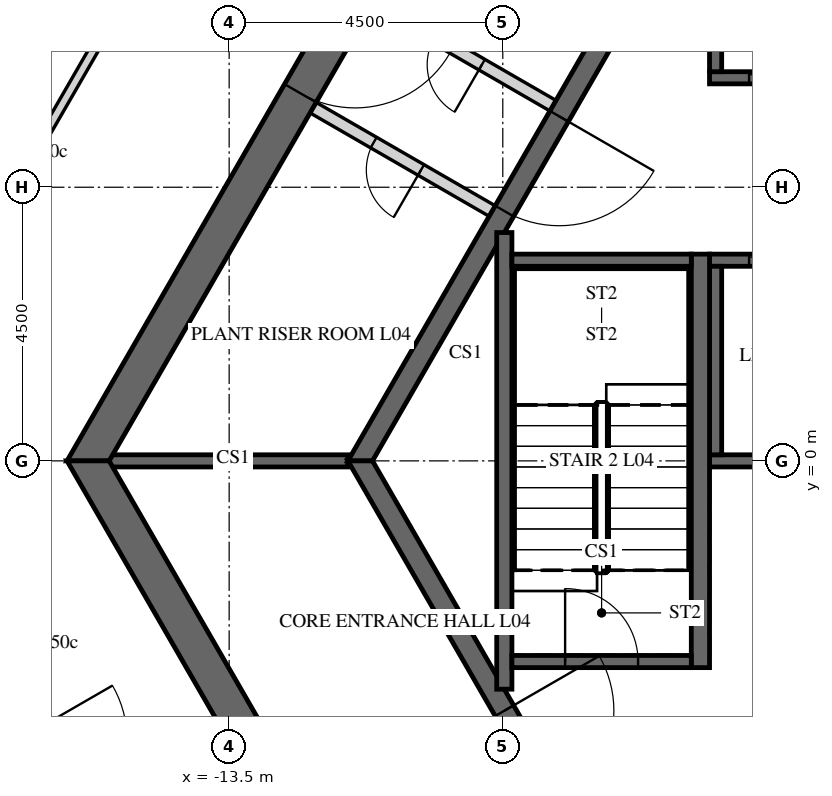
"""IFC4 building model, lengths in metres.
Left out: names, types, materials, properties, quantities, classifications, styles, units other than length and angle.
Written with IfcOpenShell. Run it as: python <this file> out.ifc"""

import sys

from ifc_helpers import new_model, si_unit, direction, frame, frame_2d, origin, place, context, subcontext, project, spatial, polyline, rectangle, outline, extrude, element, fill, save


model = new_model("IFC4")
c1 = context("Model", 3, precision=1e-05, world=origin(), true_north=direction((0.0, 1.0)))
c2 = subcontext(c1, "Body", "Model", "MODEL_VIEW")
j1 = project(units=[si_unit("LENGTHUNIT", "METRE"), si_unit("PLANEANGLEUNIT", "RADIAN")], contexts=[c1])
p1 = place(None, origin())
s1 = spatial("IfcSite", under=j1, at=p1, CompositionType="ELEMENT")
p2 = place(p1, origin())
s2 = spatial("IfcBuilding", under=s1, at=p2, CompositionType="ELEMENT")
p3 = place(p2, frame((0.0, 0.0, 26.0)))
s3 = spatial("IfcBuildingStorey", under=s2, at=p3, CompositionType="ELEMENT", Elevation=26.0)
p4 = place(p3, frame((-7.91, 13.7, -0.25), z_axis=(0.0, 0.0, 1.0), x_axis=(-0.499999880136, -0.866025472988, 0.0)))
e1 = element("IfcWall", 1, at=p4, inside=s3, PredefinedType="SHEAR", context=c2, shape_type="SweptSolid", body=[
    extrude(outline(polyline([(-0.173, -0.3), (15.993, -0.3), (15.646, 0.3), (0.173, 0.3), (-0.173, -0.3)])), origin(), (0.0, 0.0, 1.0), 5.45),
])
p5 = place(p4, frame((7.039, 0.0, 0.25)))
e2 = element("IfcOpeningElement", 2, at=p5, cuts=e1, PredefinedType="OPENING", context=c2, shape_type="SweptSolid", body=[
    extrude(rectangle(XDim=1.8, YDim=2.4, at=frame_2d((0.9, 1.2))), frame((0.0, 0.31, 0.0), z_axis=(0.0, -1.0, 0.0), x_axis=(1.0, 0.0, 0.0)), (0.0, 0.0, 1.0), 0.62),
])
p6 = place(p3, frame((-15.819, 0.0, -0.25), z_axis=(0.0, 0.0, 1.0), x_axis=(0.499999880136, -0.866025472988, 0.0)))
e3 = element("IfcWall", 3, at=p6, inside=s3, PredefinedType="SHEAR", context=c2, shape_type="SweptSolid", body=[
    extrude(outline(polyline([(-0.173, -0.3), (15.993, -0.3), (15.646, 0.3), (0.173, 0.3), (-0.173, -0.3)])), origin(), (0.0, 0.0, 1.0), 5.45),
])
p7 = place(p6, frame((6.981, 0.0, 0.25)))
e4 = element("IfcOpeningElement", 4, at=p7, cuts=e3, PredefinedType="OPENING", context=c2, shape_type="SweptSolid", body=[
    extrude(rectangle(XDim=1.8, YDim=2.4, at=frame_2d((0.9, 1.2))), frame((0.0, 0.31, 0.0), z_axis=(0.0, -1.0, 0.0), x_axis=(1.0, 0.0, 0.0)), (0.0, 0.0, 1.0), 0.62),
])
p8 = place(p3, frame((-5.673, 9.825, -0.25), z_axis=(0.0, 0.0, 1.0), x_axis=(-0.499995046907, -0.866028263435, 0.0)))
e5 = element("IfcWall", 5, at=p8, inside=s3, PredefinedType="SHEAR", context=c2, shape_type="SweptSolid", body=[
    extrude(outline(polyline([(-0.101, -0.175), (11.446, -0.175), (11.244, 0.175), (0.101, 0.175), (-0.101, -0.175)])), origin(), (0.0, 0.0, 1.0), 5.45),
])
p9 = place(p8, frame((4.801, 0.0, 0.25)))
e6 = element("IfcOpeningElement", 6, at=p9, cuts=e5, PredefinedType="OPENING", context=c2, shape_type="SweptSolid", body=[
    extrude(rectangle(XDim=1.8, YDim=2.4, at=frame_2d((0.9, 1.2))), frame((0.0, 0.185, 0.0), z_axis=(0.0, -1.0, 0.0), x_axis=(1.0, 0.0, 0.0)), (0.0, 0.0, 1.0), 0.37),
])
p10 = place(p3, frame((-11.345, 0.0, -0.25), z_axis=(0.0, 0.0, 1.0), x_axis=(0.499995046907, -0.866028263435, 0.0)))
e7 = element("IfcWall", 7, at=p10, inside=s3, PredefinedType="SHEAR", context=c2, shape_type="SweptSolid", body=[
    extrude(outline(polyline([(-0.101, -0.175), (11.446, -0.175), (11.244, 0.175), (0.101, 0.175), (-0.101, -0.175)])), origin(), (0.0, 0.0, 1.0), 5.45),
])
p11 = place(p10, frame((4.744, 0.0, 0.25)))
e8 = element("IfcOpeningElement", 8, at=p11, cuts=e7, PredefinedType="OPENING", context=c2, shape_type="SweptSolid", body=[
    extrude(rectangle(XDim=1.8, YDim=2.4, at=frame_2d((0.9, 1.2))), frame((0.0, 0.185, 0.0), z_axis=(0.0, -1.0, 0.0), x_axis=(1.0, 0.0, 0.0)), (0.0, 0.0, 1.0), 0.37),
])
p12 = place(p3, frame((-5.6, 6.3, -0.25), z_axis=(0.0, 0.0, 1.0), x_axis=(1.0, 0.0, 0.0)))
e9 = element("IfcWall", 9, at=p12, inside=s3, PredefinedType="SHEAR", context=c2, shape_type="SweptSolid", body=[
    extrude(rectangle(XDim=11.2, YDim=0.2, at=frame_2d((5.6, 0.0))), origin(), (0.0, 0.0, 1.0), 5.5),
])
p13 = place(p12, frame((0.65, 0.0, 0.25)))
e10 = element("IfcOpeningElement", 10, at=p13, cuts=e9, PredefinedType="OPENING", context=c2, shape_type="SweptSolid", body=[
    extrude(rectangle(XDim=1.1, YDim=2.1, at=frame_2d((0.55, 1.05))), frame((0.0, 0.11, 0.0), z_axis=(0.0, -1.0, 0.0), x_axis=(1.0, 0.0, 0.0)), (0.0, 0.0, 1.0), 0.22),
])
p14 = place(p12, frame((2.85, 0.0, 0.25)))
e11 = element("IfcOpeningElement", 11, at=p14, cuts=e9, PredefinedType="OPENING", context=c2, shape_type="SweptSolid", body=[
    extrude(rectangle(XDim=1.1, YDim=2.1, at=frame_2d((0.55, 1.05))), frame((0.0, 0.11, 0.0), z_axis=(0.0, -1.0, 0.0), x_axis=(1.0, 0.0, 0.0)), (0.0, 0.0, 1.0), 0.22),
])
p15 = place(p12, frame((5.05, 0.0, 0.25)))
e12 = element("IfcOpeningElement", 12, at=p15, cuts=e9, PredefinedType="OPENING", context=c2, shape_type="SweptSolid", body=[
    extrude(rectangle(XDim=1.1, YDim=2.1, at=frame_2d((0.55, 1.05))), frame((0.0, 0.11, 0.0), z_axis=(0.0, -1.0, 0.0), x_axis=(1.0, 0.0, 0.0)), (0.0, 0.0, 1.0), 0.22),
])
p16 = place(p12, frame((7.25, 0.0, 0.25)))
e13 = element("IfcOpeningElement", 13, at=p16, cuts=e9, PredefinedType="OPENING", context=c2, shape_type="SweptSolid", body=[
    extrude(rectangle(XDim=1.1, YDim=2.1, at=frame_2d((0.55, 1.05))), frame((0.0, 0.11, 0.0), z_axis=(0.0, -1.0, 0.0), x_axis=(1.0, 0.0, 0.0)), (0.0, 0.0, 1.0), 0.22),
])
p17 = place(p12, frame((9.45, 0.0, 0.25)))
e14 = element("IfcOpeningElement", 14, at=p17, cuts=e9, PredefinedType="OPENING", context=c2, shape_type="SweptSolid", body=[
    extrude(rectangle(XDim=1.1, YDim=2.1, at=frame_2d((0.55, 1.05))), frame((0.0, 0.11, 0.0), z_axis=(0.0, -1.0, 0.0), x_axis=(1.0, 0.0, 0.0)), (0.0, 0.0, 1.0), 0.22),
])
p18 = place(p3, frame((-5.5, 6.4, -0.25), z_axis=(0.0, 0.0, 1.0), x_axis=(0.0, 1.0, 0.0)))
e15 = element("IfcWall", 15, at=p18, inside=s3, PredefinedType="SHEAR", context=c2, shape_type="SweptSolid", body=[
    extrude(rectangle(XDim=2.9, YDim=0.2, at=frame_2d((1.45, 0.0))), origin(), (0.0, 0.0, 1.0), 5.5),
])
p19 = place(p3, frame((-5.6, 3.3, -0.25), z_axis=(0.0, 0.0, 1.0), x_axis=(1.0, 0.0, 0.0)))
e16 = element("IfcWall", 16, at=p19, inside=s3, PredefinedType="SHEAR", context=c2, shape_type="SweptSolid", body=[
    extrude(rectangle(XDim=11.2, YDim=0.2, at=frame_2d((5.6, 0.0))), origin(), (0.0, 0.0, 1.0), 5.5),
])
p20 = place(p19, frame((0.65, 0.0, 0.25)))
e17 = element("IfcOpeningElement", 17, at=p20, cuts=e16, PredefinedType="OPENING", context=c2, shape_type="SweptSolid", body=[
    extrude(rectangle(XDim=1.1, YDim=2.1, at=frame_2d((0.55, 1.05))), frame((0.0, 0.11, 0.0), z_axis=(0.0, -1.0, 0.0), x_axis=(1.0, 0.0, 0.0)), (0.0, 0.0, 1.0), 0.22),
])
p21 = place(p19, frame((2.85, 0.0, 0.25)))
e18 = element("IfcOpeningElement", 18, at=p21, cuts=e16, PredefinedType="OPENING", context=c2, shape_type="SweptSolid", body=[
    extrude(rectangle(XDim=1.1, YDim=2.1, at=frame_2d((0.55, 1.05))), frame((0.0, 0.11, 0.0), z_axis=(0.0, -1.0, 0.0), x_axis=(1.0, 0.0, 0.0)), (0.0, 0.0, 1.0), 0.22),
])
p22 = place(p19, frame((5.05, 0.0, 0.25)))
e19 = element("IfcOpeningElement", 19, at=p22, cuts=e16, PredefinedType="OPENING", context=c2, shape_type="SweptSolid", body=[
    extrude(rectangle(XDim=1.1, YDim=2.1, at=frame_2d((0.55, 1.05))), frame((0.0, 0.11, 0.0), z_axis=(0.0, -1.0, 0.0), x_axis=(1.0, 0.0, 0.0)), (0.0, 0.0, 1.0), 0.22),
])
p23 = place(p19, frame((7.25, 0.0, 0.25)))
e20 = element("IfcOpeningElement", 20, at=p23, cuts=e16, PredefinedType="OPENING", context=c2, shape_type="SweptSolid", body=[
    extrude(rectangle(XDim=1.1, YDim=2.1, at=frame_2d((0.55, 1.05))), frame((0.0, 0.11, 0.0), z_axis=(0.0, -1.0, 0.0), x_axis=(1.0, 0.0, 0.0)), (0.0, 0.0, 1.0), 0.22),
])
p24 = place(p19, frame((9.45, 0.0, 0.25)))
e21 = element("IfcOpeningElement", 21, at=p24, cuts=e16, PredefinedType="OPENING", context=c2, shape_type="SweptSolid", body=[
    extrude(rectangle(XDim=1.1, YDim=2.1, at=frame_2d((0.55, 1.05))), frame((0.0, 0.11, 0.0), z_axis=(0.0, -1.0, 0.0), x_axis=(1.0, 0.0, 0.0)), (0.0, 0.0, 1.0), 0.22),
])
p25 = place(p3, frame((-5.6, 0.0, -0.25), z_axis=(0.0, 0.0, 1.0), x_axis=(1.0, 0.0, 0.0)))
e22 = element("IfcWall", 22, at=p25, inside=s3, PredefinedType="SHEAR", context=c2, shape_type="SweptSolid", body=[
    extrude(rectangle(XDim=11.2, YDim=0.2, at=frame_2d((5.6, 0.0))), origin(), (0.0, 0.0, 1.0), 5.5),
])
p26 = place(p3, frame((-5.5, 0.1, -0.25), z_axis=(0.0, 0.0, 1.0), x_axis=(0.0, 1.0, 0.0)))
e23 = element("IfcWall", 23, at=p26, inside=s3, PredefinedType="SHEAR", context=c2, shape_type="SweptSolid", body=[
    extrude(rectangle(XDim=3.1, YDim=0.2, at=frame_2d((1.55, 0.0))), origin(), (0.0, 0.0, 1.0), 5.5),
])
p27 = place(p3, frame((-11.547, 0.0, -0.25), z_axis=(0.0, 0.0, 1.0), x_axis=(-1.0, 0.0, 0.0)))
e24 = element("IfcWall", 24, at=p27, inside=s3, PredefinedType="SHEAR", context=c2, shape_type="SweptSolid", body=[
    extrude(rectangle(XDim=3.926, YDim=0.2, at=frame_2d((1.963, 0.0))), origin(), (0.0, 0.0, 1.0), 5.45),
])
p28 = place(p3, frame((-9.175, 4.109, 0.0), z_axis=(0.0, 0.0, 1.0), x_axis=(-0.865989465428, 0.500062241894, 0.0)))
e25 = element("IfcWall", 25, at=p28, inside=s3, PredefinedType="PARTITIONING", context=c2, shape_type="SweptSolid", body=[
    extrude(rectangle(XDim=3.4, YDim=0.2, at=frame_2d((1.7, 0.0))), origin(), (0.0, 0.0, 1.0), 5.25),
])
p29 = place(p28, frame((1.351, 0.0, 0.0)))
e26 = element("IfcOpeningElement", 26, at=p29, cuts=e25, PredefinedType="OPENING", context=c2, shape_type="SweptSolid", body=[
    extrude(rectangle(XDim=0.9, YDim=2.1, at=frame_2d((0.45, 1.05))), frame((0.0, 0.11, 0.0), z_axis=(0.0, -1.0, 0.0), x_axis=(1.0, 0.0, 0.0)), (0.0, 0.0, 1.0), 0.22),
])
p30 = place(p3, frame((-8.175, 5.841, 0.0), z_axis=(0.0, 0.0, 1.0), x_axis=(-0.866020560687, 0.500008388397, 0.0)))
e27 = element("IfcWall", 27, at=p30, inside=s3, PredefinedType="PARTITIONING", context=c2, shape_type="SweptSolid", body=[
    extrude(rectangle(XDim=3.4, YDim=0.2, at=frame_2d((1.7, 0.0))), origin(), (0.0, 0.0, 1.0), 5.25),
])
p31 = place(p30, frame((1.35, 0.0, 0.0)))
e28 = element("IfcOpeningElement", 28, at=p31, cuts=e27, PredefinedType="OPENING", context=c2, shape_type="SweptSolid", body=[
    extrude(rectangle(XDim=0.9, YDim=2.1, at=frame_2d((0.45, 1.05))), frame((0.0, 0.11, 0.0), z_axis=(0.0, -1.0, 0.0), x_axis=(1.0, 0.0, 0.0)), (0.0, 0.0, 1.0), 0.22),
])
p32 = place(p3, frame((-5.75, -3.4, -0.25), z_axis=(0.0, 0.0, 1.0), x_axis=(0.0, 1.0, 0.0)))
e29 = element("IfcWall", 29, at=p32, inside=s3, PredefinedType="SHEAR", context=c2, shape_type="SweptSolid", body=[
    extrude(rectangle(XDim=6.8, YDim=0.3, at=frame_2d((3.4, 0.0))), origin(), (0.0, 0.0, 1.0), 5.5),
])
p33 = place(p3, frame((-8.975, -3.755, -0.25), z_axis=(0.0, 0.0, 1.0), x_axis=(0.0, 1.0, 0.0)))
e30 = element("IfcWall", 30, at=p33, inside=s3, PredefinedType="SHEAR", context=c2, shape_type="SweptSolid", body=[
    extrude(rectangle(XDim=7.51, YDim=0.25, at=frame_2d((3.755, 0.0))), origin(), (0.0, 0.0, 1.0), 5.5),
])
p34 = place(p3, frame((-8.85, 3.3, -0.25), z_axis=(0.0, 0.0, 1.0), x_axis=(1.0, 0.0, 0.0)))
e31 = element("IfcWall", 31, at=p34, inside=s3, PredefinedType="SHEAR", context=c2, shape_type="SweptSolid", body=[
    extrude(rectangle(XDim=2.95, YDim=0.2, at=frame_2d((1.475, 0.0))), origin(), (0.0, 0.0, 1.0), 5.5),
])
p35 = place(p3, frame((-8.85, -3.3, -0.25), z_axis=(0.0, 0.0, 1.0), x_axis=(1.0, 0.0, 0.0)))
e32 = element("IfcWall", 32, at=p35, inside=s3, PredefinedType="SHEAR", context=c2, shape_type="SweptSolid", body=[
    extrude(rectangle(XDim=2.95, YDim=0.2, at=frame_2d((1.475, 0.0))), origin(), (0.0, 0.0, 1.0), 5.5),
])
p36 = place(p35, frame((0.875, 0.0, 0.25)))
e33 = element("IfcOpeningElement", 33, at=p36, cuts=e32, PredefinedType="OPENING", context=c2, shape_type="SweptSolid", body=[
    extrude(rectangle(XDim=1.2, YDim=2.4, at=frame_2d((0.6, 1.2))), frame((0.0, 0.11, 0.0), z_axis=(0.0, -1.0, 0.0), x_axis=(1.0, 0.0, 0.0)), (0.0, 0.0, 1.0), 0.22),
])
p37 = place(p3, frame((-18.649, -1.7, 0.0), z_axis=(0.0, 0.0, 1.0), x_axis=(0.499976511579, -0.866038964406, 0.0)))
e34 = element("IfcWall", 34, at=p37, inside=s3, PredefinedType="PARTITIONING", context=c2, shape_type="SweptSolid", body=[
    extrude(rectangle(XDim=8.485, YDim=0.15, at=frame_2d((4.242, 0.0))), origin(), (0.0, 0.0, 1.0), 5.2),
])
p38 = place(p37, frame((3.342, 0.0, 0.0)))
e35 = element("IfcOpeningElement", 35, at=p38, cuts=e34, PredefinedType="OPENING", context=c2, shape_type="SweptSolid", body=[
    extrude(rectangle(XDim=1.8, YDim=2.1, at=frame_2d((0.9, 1.05))), frame((0.0, 0.085, 0.0), z_axis=(0.0, -1.0, 0.0), x_axis=(1.0, 0.0, 0.0)), (0.0, 0.0, 1.0), 0.17),
])
p39 = place(p3, frame((-14.723, 8.5, 0.0), z_axis=(0.0, 0.0, 1.0), x_axis=(-0.499993197506, -0.86602933117, 0.0)))
e36 = element("IfcWall", 36, at=p39, inside=s3, PredefinedType="PARTITIONING", context=c2, shape_type="SweptSolid", body=[
    extrude(rectangle(XDim=7.91, YDim=0.15, at=frame_2d((3.955, 0.0))), origin(), (0.0, 0.0, 1.0), 5.2),
])
p40 = place(p5, origin())
e37 = element("IfcDoor", 37, at=p40, inside=s3, OperationType="DOUBLE_DOOR_SINGLE_SWING", PredefinedType="DOOR", context=c2, shape_type="SweptSolid", body=[
    extrude(rectangle(XDim=1.8, YDim=2.4, at=frame_2d((0.9, 1.2))), frame((0.0, 0.025, 0.0), z_axis=(0.0, -1.0, 0.0), x_axis=(1.0, 0.0, 0.0)), (0.0, 0.0, 1.0), 0.05),
])
fill(e2, e37)
p41 = place(p9, origin())
e38 = element("IfcDoor", 38, at=p41, inside=s3, OperationType="DOUBLE_DOOR_SINGLE_SWING", PredefinedType="DOOR", context=c2, shape_type="SweptSolid", body=[
    extrude(rectangle(XDim=1.8, YDim=2.4, at=frame_2d((0.9, 1.2))), frame((0.0, 0.025, 0.0), z_axis=(0.0, -1.0, 0.0), x_axis=(1.0, 0.0, 0.0)), (0.0, 0.0, 1.0), 0.05),
])
fill(e6, e38)
p42 = place(p11, origin())
e39 = element("IfcDoor", 39, at=p42, inside=s3, OperationType="DOUBLE_DOOR_SINGLE_SWING", PredefinedType="DOOR", context=c2, shape_type="SweptSolid", body=[
    extrude(rectangle(XDim=1.8, YDim=2.4, at=frame_2d((0.9, 1.2))), frame((0.0, 0.025, 0.0), z_axis=(0.0, -1.0, 0.0), x_axis=(1.0, 0.0, 0.0)), (0.0, 0.0, 1.0), 0.05),
])
fill(e8, e39)
p43 = place(p29, origin())
e40 = element("IfcDoor", 40, at=p43, inside=s3, OperationType="SINGLE_SWING_LEFT", PredefinedType="DOOR", context=c2, shape_type="SweptSolid", body=[
    extrude(rectangle(XDim=0.9, YDim=2.1, at=frame_2d((0.45, 1.05))), frame((0.0, 0.025, 0.0), z_axis=(0.0, -1.0, 0.0), x_axis=(1.0, 0.0, 0.0)), (0.0, 0.0, 1.0), 0.05),
])
fill(e26, e40)
p44 = place(p31, origin())
e41 = element("IfcDoor", 41, at=p44, inside=s3, OperationType="SINGLE_SWING_LEFT", PredefinedType="DOOR", context=c2, shape_type="SweptSolid", body=[
    extrude(rectangle(XDim=0.9, YDim=2.1, at=frame_2d((0.45, 1.05))), frame((0.0, 0.025, 0.0), z_axis=(0.0, -1.0, 0.0), x_axis=(1.0, 0.0, 0.0)), (0.0, 0.0, 1.0), 0.05),
])
fill(e28, e41)
p45 = place(p36, origin())
e42 = element("IfcDoor", 42, at=p45, inside=s3, OperationType="SINGLE_SWING_LEFT", PredefinedType="DOOR", context=c2, shape_type="SweptSolid", body=[
    extrude(rectangle(XDim=1.2, YDim=2.4, at=frame_2d((0.6, 1.2))), frame((0.0, 0.025, 0.0), z_axis=(0.0, -1.0, 0.0), x_axis=(1.0, 0.0, 0.0)), (0.0, 0.0, 1.0), 0.05),
])
fill(e33, e42)
p46 = place(p13, origin())
e43 = element("IfcDoor", 43, at=p46, inside=s3, OperationType="SLIDING_TO_LEFT", PredefinedType="DOOR", context=c2, shape_type="SweptSolid", body=[
    extrude(rectangle(XDim=1.1, YDim=2.1, at=frame_2d((0.55, 1.05))), frame((0.0, 0.025, 0.0), z_axis=(0.0, -1.0, 0.0), x_axis=(1.0, 0.0, 0.0)), (0.0, 0.0, 1.0), 0.05),
])
fill(e10, e43)
p47 = place(p20, origin())
e44 = element("IfcDoor", 44, at=p47, inside=s3, OperationType="SLIDING_TO_LEFT", PredefinedType="DOOR", context=c2, shape_type="SweptSolid", body=[
    extrude(rectangle(XDim=1.1, YDim=2.1, at=frame_2d((0.55, 1.05))), frame((0.0, 0.025, 0.0), z_axis=(0.0, -1.0, 0.0), x_axis=(1.0, 0.0, 0.0)), (0.0, 0.0, 1.0), 0.05),
])
fill(e17, e44)
save(model, sys.argv[1])
